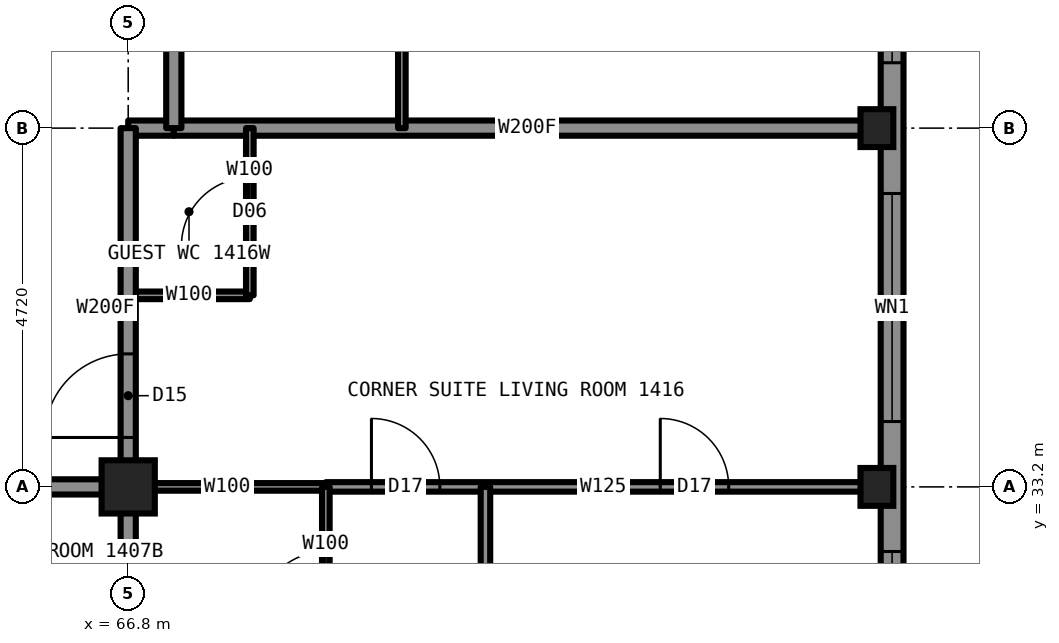
"""IFC4 building model, lengths in metres.
Left out: names, types, materials, properties, quantities, classifications, styles, units other than length and angle.
Written with IfcOpenShell. Run it as: python <this file> out.ifc"""

import sys

from ifc_helpers import new_model, si_unit, direction, frame, frame_2d, origin, origin_2d, place, context, subcontext, project, spatial, rectangle, hollow_rectangle, i_section, extrude, element, fill, save


model = new_model("IFC4")
c1 = context("Model", 3, precision=1e-05, world=origin(), true_north=direction((0.0, 1.0)))
c2 = subcontext(c1, "Body", "Model", "MODEL_VIEW")
j1 = project(units=[si_unit("LENGTHUNIT", "METRE"), si_unit("PLANEANGLEUNIT", "RADIAN")], contexts=[c1])
p1 = place(None, origin())
s1 = spatial("IfcSite", under=j1, at=p1, CompositionType="ELEMENT")
p2 = place(p1, origin())
s2 = spatial("IfcBuilding", under=s1, at=p2, CompositionType="ELEMENT")
p3 = place(p2, frame((0.0, 0.0, 49.5)))
s3 = spatial("IfcBuildingStorey", under=s2, at=p3, CompositionType="ELEMENT", Elevation=49.5)
for number, where, z_axis, x_axis in (
    (1, (76.65, 33.2, 0.0), (0.0, 0.0, 1.0), (1.0, 0.0, 0.0)),
    (2, (76.65, 37.92, 0.0), (0.0, 0.0, 1.0), (1.0, 0.0, 0.0)),
):
    element("IfcColumn", number, at=place(p3, frame(where, z_axis=z_axis, x_axis=x_axis)), inside=s3, PredefinedType="COLUMN", context=c2, shape_type="SweptSolid", body=[
        extrude(i_section(OverallWidth=0.432, OverallDepth=0.498, WebThickness=0.056, FlangeThickness=0.089, at=origin_2d()), origin(), (0.0, 0.0, 1.0), 3.5),
    ])
p4 = place(p3, frame((66.8, 33.2, 0.0), z_axis=(0.0, 0.0, 1.0), x_axis=(1.0, 0.0, 0.0)))
e3 = element("IfcColumn", 3, at=p4, inside=s3, PredefinedType="COLUMN", context=c2, shape_type="SweptSolid", body=[
    extrude(hollow_rectangle(XDim=0.7, YDim=0.7, WallThickness=0.06, at=origin_2d()), origin(), (0.0, 0.0, 1.0), 3.5),
])
p5 = place(p3, frame((66.8, 33.2, 0.0), z_axis=(0.0, 0.0, 1.0), x_axis=(1.0, 0.0, 0.0)))
e4 = element("IfcWall", 4, at=p5, inside=s3, PredefinedType="PARTITIONING", context=c2, shape_type="SweptSolid", body=[
    extrude(rectangle(XDim=2.6, YDim=0.1, at=frame_2d((1.3, 0.0))), origin(), (0.0, 0.0, 1.0), 2.573),
])
p6 = place(p3, frame((43.2, 33.2, 0.0), z_axis=(0.0, 0.0, 1.0), x_axis=(1.0, 0.0, 0.0)))
e5 = element("IfcWall", 5, at=p6, inside=s3, PredefinedType="PARTITIONING", context=c2, shape_type="SweptSolid", body=[
    extrude(rectangle(XDim=23.6, YDim=0.2, at=frame_2d((11.8, 0.0))), origin(), (0.0, 0.0, 1.0), 3.33),
])
p7 = place(p6, frame((3.0, 0.0, 0.0)))
e6 = element("IfcOpeningElement", 6, at=p7, cuts=e5, PredefinedType="OPENING", context=c2, shape_type="SweptSolid", body=[
    extrude(rectangle(XDim=1.0, YDim=2.2, at=frame_2d((0.5, 1.1))), frame((0.0, 0.11, 0.0), z_axis=(0.0, -1.0, 0.0), x_axis=(1.0, 0.0, 0.0)), (0.0, 0.0, 1.0), 0.22),
])
p8 = place(p6, frame((12.44, 0.0, 0.0)))
e7 = element("IfcOpeningElement", 7, at=p8, cuts=e5, PredefinedType="OPENING", context=c2, shape_type="SweptSolid", body=[
    extrude(rectangle(XDim=1.0, YDim=2.2, at=frame_2d((0.5, 1.1))), frame((0.0, 0.11, 0.0), z_axis=(0.0, -1.0, 0.0), x_axis=(1.0, 0.0, 0.0)), (0.0, 0.0, 1.0), 0.22),
])
p9 = place(p6, frame((19.28, 0.0, 0.0)))
e8 = element("IfcOpeningElement", 8, at=p9, cuts=e5, PredefinedType="OPENING", context=c2, shape_type="SweptSolid", body=[
    extrude(rectangle(XDim=1.0, YDim=2.2, at=frame_2d((0.5, 1.1))), frame((0.0, 0.11, 0.0), z_axis=(0.0, -1.0, 0.0), x_axis=(1.0, 0.0, 0.0)), (0.0, 0.0, 1.0), 0.22),
])
p10 = place(p3, frame((69.4, 33.2, 0.0), z_axis=(0.0, 0.0, 1.0), x_axis=(1.0, 0.0, 0.0)))
e9 = element("IfcWall", 9, at=p10, inside=s3, PredefinedType="PARTITIONING", context=c2, shape_type="SweptSolid", body=[
    extrude(rectangle(XDim=7.3, YDim=0.125, at=frame_2d((3.65, 0.0))), origin(), (0.0, 0.0, 1.0), 2.573),
])
p11 = place(p10, frame((0.6, 0.0, 0.0)))
e10 = element("IfcOpeningElement", 10, at=p11, cuts=e9, PredefinedType="OPENING", context=c2, shape_type="SweptSolid", body=[
    extrude(rectangle(XDim=0.9, YDim=2.2, at=frame_2d((0.45, 1.1))), frame((0.0, 0.073, 0.0), z_axis=(0.0, -1.0, 0.0), x_axis=(1.0, 0.0, 0.0)), (0.0, 0.0, 1.0), 0.145),
])
p12 = place(p10, frame((4.4, 0.0, 0.0)))
e11 = element("IfcOpeningElement", 11, at=p12, cuts=e9, PredefinedType="OPENING", context=c2, shape_type="SweptSolid", body=[
    extrude(rectangle(XDim=0.9, YDim=2.2, at=frame_2d((0.45, 1.1))), frame((0.0, 0.073, 0.0), z_axis=(0.0, -1.0, 0.0), x_axis=(1.0, 0.0, 0.0)), (0.0, 0.0, 1.0), 0.145),
])
p13 = place(p3, frame((66.8, 37.92, 0.0), z_axis=(0.0, 0.0, 1.0), x_axis=(1.0, 0.0, 0.0)))
e12 = element("IfcWall", 12, at=p13, inside=s3, PredefinedType="PARTITIONING", context=c2, shape_type="SweptSolid", body=[
    extrude(rectangle(XDim=0.6, YDim=0.2, at=frame_2d((0.3, 0.0))), origin(), (0.0, 0.0, 1.0), 2.573),
])
p14 = place(p3, frame((67.4, 37.92, 0.0), z_axis=(0.0, 0.0, 1.0), x_axis=(1.0, 0.0, 0.0)))
e13 = element("IfcWall", 13, at=p14, inside=s3, PredefinedType="PARTITIONING", context=c2, shape_type="SweptSolid", body=[
    extrude(rectangle(XDim=9.3, YDim=0.2, at=frame_2d((4.65, 0.0))), origin(), (0.0, 0.0, 1.0), 2.573),
])
p15 = place(p3, frame((66.8, 35.72, 0.0), z_axis=(0.0, 0.0, 1.0), x_axis=(1.0, 0.0, 0.0)))
e14 = element("IfcWall", 14, at=p15, inside=s3, PredefinedType="PARTITIONING", context=c2, shape_type="SweptSolid", body=[
    extrude(rectangle(XDim=1.6, YDim=0.1, at=frame_2d((0.8, 0.0))), origin(), (0.0, 0.0, 1.0), 2.723),
])
p16 = place(p3, frame((66.8, 33.2, 0.0), z_axis=(0.0, 0.0, 1.0), x_axis=(0.0, 1.0, 0.0)))
e15 = element("IfcWall", 15, at=p16, inside=s3, PredefinedType="PARTITIONING", context=c2, shape_type="SweptSolid", body=[
    extrude(rectangle(XDim=4.72, YDim=0.2, at=frame_2d((2.36, 0.0))), origin(), (0.0, 0.0, 1.0), 3.33),
])
p17 = place(p16, frame((0.65, 0.0, 0.0)))
e16 = element("IfcOpeningElement", 16, at=p17, cuts=e15, PredefinedType="OPENING", context=c2, shape_type="SweptSolid", body=[
    extrude(rectangle(XDim=1.1, YDim=2.2, at=frame_2d((0.55, 1.1))), frame((0.0, 0.11, 0.0), z_axis=(0.0, -1.0, 0.0), x_axis=(1.0, 0.0, 0.0)), (0.0, 0.0, 1.0), 0.22),
])
p18 = place(p3, frame((66.8, 30.6, 0.0), z_axis=(0.0, 0.0, 1.0), x_axis=(0.0, 1.0, 0.0)))
e17 = element("IfcWall", 17, at=p18, inside=s3, PredefinedType="PARTITIONING", context=c2, shape_type="SweptSolid", body=[
    extrude(rectangle(XDim=2.6, YDim=0.2, at=frame_2d((1.3, 0.0))), origin(), (0.0, 0.0, 1.0), 2.573),
])
p19 = place(p3, frame((67.4, 37.92, 0.0), z_axis=(0.0, 0.0, 1.0), x_axis=(0.0, 1.0, 0.0)))
e18 = element("IfcWall", 18, at=p19, inside=s3, PredefinedType="PARTITIONING", context=c2, shape_type="SweptSolid", body=[
    extrude(rectangle(XDim=14.16, YDim=0.2, at=frame_2d((7.08, 0.0))), origin(), (0.0, 0.0, 1.0), 3.33),
])
p20 = place(p19, frame((3.15, 0.0, 0.0)))
e19 = element("IfcOpeningElement", 19, at=p20, cuts=e18, PredefinedType="OPENING", context=c2, shape_type="SweptSolid", body=[
    extrude(rectangle(XDim=1.0, YDim=2.2, at=frame_2d((0.5, 1.1))), frame((0.0, 0.11, 0.0), z_axis=(0.0, -1.0, 0.0), x_axis=(1.0, 0.0, 0.0)), (0.0, 0.0, 1.0), 0.22),
])
p21 = place(p19, frame((7.72, 0.0, 0.0)))
e20 = element("IfcOpeningElement", 20, at=p21, cuts=e18, PredefinedType="OPENING", context=c2, shape_type="SweptSolid", body=[
    extrude(rectangle(XDim=1.0, YDim=2.2, at=frame_2d((0.5, 1.1))), frame((0.0, 0.11, 0.0), z_axis=(0.0, -1.0, 0.0), x_axis=(1.0, 0.0, 0.0)), (0.0, 0.0, 1.0), 0.22),
])
p22 = place(p3, frame((68.4, 35.72, 0.0), z_axis=(0.0, 0.0, 1.0), x_axis=(0.0, 1.0, 0.0)))
e21 = element("IfcWall", 21, at=p22, inside=s3, PredefinedType="PARTITIONING", context=c2, shape_type="SweptSolid", body=[
    extrude(rectangle(XDim=2.2, YDim=0.1, at=frame_2d((1.1, 0.0))), origin(), (0.0, 0.0, 1.0), 3.33),
])
p23 = place(p22, frame((0.65, 0.0, 0.0)))
e22 = element("IfcOpeningElement", 22, at=p23, cuts=e21, PredefinedType="OPENING", context=c2, shape_type="SweptSolid", body=[
    extrude(rectangle(XDim=0.9, YDim=2.1, at=frame_2d((0.45, 1.05))), frame((0.0, 0.06, 0.0), z_axis=(0.0, -1.0, 0.0), x_axis=(1.0, 0.0, 0.0)), (0.0, 0.0, 1.0), 0.12),
])
p24 = place(p3, frame((69.4, 30.6, 0.0), z_axis=(0.0, 0.0, 1.0), x_axis=(0.0, 1.0, 0.0)))
e23 = element("IfcWall", 23, at=p24, inside=s3, PredefinedType="PARTITIONING", context=c2, shape_type="SweptSolid", body=[
    extrude(rectangle(XDim=2.6, YDim=0.1, at=frame_2d((1.3, 0.0))), origin(), (0.0, 0.0, 1.0), 3.33),
])
p25 = place(p24, frame((0.85, 0.0, 0.0)))
e24 = element("IfcOpeningElement", 24, at=p25, cuts=e23, PredefinedType="OPENING", context=c2, shape_type="SweptSolid", body=[
    extrude(rectangle(XDim=0.9, YDim=2.1, at=frame_2d((0.45, 1.05))), frame((0.0, 0.06, 0.0), z_axis=(0.0, -1.0, 0.0), x_axis=(1.0, 0.0, 0.0)), (0.0, 0.0, 1.0), 0.12),
])
p26 = place(p3, frame((70.4, 37.92, 0.0), z_axis=(0.0, 0.0, 1.0), x_axis=(0.0, 1.0, 0.0)))
e25 = element("IfcWall", 25, at=p26, inside=s3, PredefinedType="PARTITIONING", context=c2, shape_type="SweptSolid", body=[
    extrude(rectangle(XDim=2.9, YDim=0.1, at=frame_2d((1.45, 0.0))), origin(), (0.0, 0.0, 1.0), 3.33),
])
p27 = place(p3, frame((71.5, 23.306, 0.0), z_axis=(0.0, 0.0, 1.0), x_axis=(0.0, 1.0, 0.0)))
e26 = element("IfcWall", 26, at=p27, inside=s3, PredefinedType="PARTITIONING", context=c2, shape_type="SweptSolid", body=[
    extrude(rectangle(XDim=9.894, YDim=0.125, at=frame_2d((4.947, 0.0))), origin(), (0.0, 0.0, 1.0), 3.33),
])
p28 = place(p3, frame((76.85, 28.5, 0.0), z_axis=(0.0, 0.0, 1.0), x_axis=(0.0, 1.0, 0.0)))
e27 = element("IfcWall", 27, at=p28, inside=s3, PredefinedType="SOLIDWALL", context=c2, shape_type="SweptSolid", body=[
    extrude(rectangle(XDim=33.0, YDim=0.3, at=frame_2d((16.5, 0.0))), origin(), (0.0, 0.0, 1.0), 2.83),
])
p29 = place(p28, frame((0.85, 0.0, 0.5)))
e28 = element("IfcOpeningElement", 28, at=p29, cuts=e27, PredefinedType="OPENING", context=c2, shape_type="SweptSolid", body=[
    extrude(rectangle(XDim=3.0, YDim=2.0, at=frame_2d((1.5, 1.0))), frame((0.0, 0.16, 0.0), z_axis=(0.0, -1.0, 0.0), x_axis=(1.0, 0.0, 0.0)), (0.0, 0.0, 1.0), 0.32),
])
p30 = place(p28, frame((5.56, 0.0, 0.5)))
e29 = element("IfcOpeningElement", 29, at=p30, cuts=e27, PredefinedType="OPENING", context=c2, shape_type="SweptSolid", body=[
    extrude(rectangle(XDim=3.0, YDim=2.0, at=frame_2d((1.5, 1.0))), frame((0.0, 0.16, 0.0), z_axis=(0.0, -1.0, 0.0), x_axis=(1.0, 0.0, 0.0)), (0.0, 0.0, 1.0), 0.32),
])
p31 = place(p28, frame((10.28, 0.0, 1.1)))
e30 = element("IfcOpeningElement", 30, at=p31, cuts=e27, PredefinedType="OPENING", context=c2, shape_type="SweptSolid", body=[
    extrude(rectangle(XDim=1.1, YDim=1.4, at=frame_2d((0.55, 0.7))), frame((0.0, 0.16, 0.0), z_axis=(0.0, -1.0, 0.0), x_axis=(1.0, 0.0, 0.0)), (0.0, 0.0, 1.0), 0.32),
])
p32 = place(p28, frame((15.0, 0.0, 0.5)))
e31 = element("IfcOpeningElement", 31, at=p32, cuts=e27, PredefinedType="OPENING", context=c2, shape_type="SweptSolid", body=[
    extrude(rectangle(XDim=3.0, YDim=2.0, at=frame_2d((1.5, 1.0))), frame((0.0, 0.16, 0.0), z_axis=(0.0, -1.0, 0.0), x_axis=(1.0, 0.0, 0.0)), (0.0, 0.0, 1.0), 0.32),
])
p33 = place(p28, frame((21.62, 0.0, 1.1)))
e32 = element("IfcOpeningElement", 32, at=p33, cuts=e27, PredefinedType="OPENING", context=c2, shape_type="SweptSolid", body=[
    extrude(rectangle(XDim=1.1, YDim=1.4, at=frame_2d((0.55, 0.7))), frame((0.0, 0.16, 0.0), z_axis=(0.0, -1.0, 0.0), x_axis=(1.0, 0.0, 0.0)), (0.0, 0.0, 1.0), 0.32),
])
p34 = place(p28, frame((24.44, 0.0, 0.5)))
e33 = element("IfcOpeningElement", 33, at=p34, cuts=e27, PredefinedType="OPENING", context=c2, shape_type="SweptSolid", body=[
    extrude(rectangle(XDim=3.0, YDim=2.0, at=frame_2d((1.5, 1.0))), frame((0.0, 0.16, 0.0), z_axis=(0.0, -1.0, 0.0), x_axis=(1.0, 0.0, 0.0)), (0.0, 0.0, 1.0), 0.32),
])
p35 = place(p28, frame((29.15, 0.0, 0.5)))
e34 = element("IfcOpeningElement", 34, at=p35, cuts=e27, PredefinedType="OPENING", context=c2, shape_type="SweptSolid", body=[
    extrude(rectangle(XDim=3.0, YDim=2.0, at=frame_2d((1.5, 1.0))), frame((0.0, 0.16, 0.0), z_axis=(0.0, -1.0, 0.0), x_axis=(1.0, 0.0, 0.0)), (0.0, 0.0, 1.0), 0.32),
])
p36 = place(p17, origin())
e35 = element("IfcDoor", 35, at=p36, inside=s3, OperationType="SINGLE_SWING_LEFT", PredefinedType="DOOR", context=c2, shape_type="SweptSolid", body=[
    extrude(rectangle(XDim=1.1, YDim=2.2, at=frame_2d((0.55, 1.1))), frame((0.0, 0.025, 0.0), z_axis=(0.0, -1.0, 0.0), x_axis=(1.0, 0.0, 0.0)), (0.0, 0.0, 1.0), 0.05),
])
fill(e16, e35)
p37 = place(p25, origin())
e36 = element("IfcDoor", 36, at=p37, inside=s3, OperationType="SINGLE_SWING_RIGHT", PredefinedType="DOOR", context=c2, shape_type="SweptSolid", body=[
    extrude(rectangle(XDim=0.9, YDim=2.1, at=frame_2d((0.45, 1.05))), frame((0.0, 0.025, 0.0), z_axis=(0.0, -1.0, 0.0), x_axis=(1.0, 0.0, 0.0)), (0.0, 0.0, 1.0), 0.05),
])
fill(e24, e36)
p38 = place(p11, origin())
e37 = element("IfcDoor", 37, at=p38, inside=s3, OperationType="SINGLE_SWING_LEFT", PredefinedType="DOOR", context=c2, shape_type="SweptSolid", body=[
    extrude(rectangle(XDim=0.9, YDim=2.2, at=frame_2d((0.45, 1.1))), frame((0.0, 0.025, 0.0), z_axis=(0.0, -1.0, 0.0), x_axis=(1.0, 0.0, 0.0)), (0.0, 0.0, 1.0), 0.05),
])
fill(e10, e37)
p39 = place(p12, origin())
e38 = element("IfcDoor", 38, at=p39, inside=s3, OperationType="SINGLE_SWING_LEFT", PredefinedType="DOOR", context=c2, shape_type="SweptSolid", body=[
    extrude(rectangle(XDim=0.9, YDim=2.2, at=frame_2d((0.45, 1.1))), frame((0.0, 0.025, 0.0), z_axis=(0.0, -1.0, 0.0), x_axis=(1.0, 0.0, 0.0)), (0.0, 0.0, 1.0), 0.05),
])
fill(e11, e38)
p40 = place(p23, origin())
e39 = element("IfcDoor", 39, at=p40, inside=s3, OperationType="SINGLE_SWING_LEFT", PredefinedType="DOOR", context=c2, shape_type="SweptSolid", body=[
    extrude(rectangle(XDim=0.9, YDim=2.1, at=frame_2d((0.45, 1.05))), frame((0.0, 0.025, 0.0), z_axis=(0.0, -1.0, 0.0), x_axis=(1.0, 0.0, 0.0)), (0.0, 0.0, 1.0), 0.05),
])
fill(e22, e39)
p41 = place(p29, origin())
e40 = element("IfcWindow", 40, at=p41, inside=s3, PartitioningType="SINGLE_PANEL", PredefinedType="WINDOW", context=c2, shape_type="SweptSolid", body=[
    extrude(rectangle(XDim=3.0, YDim=2.0, at=frame_2d((1.5, 1.0))), frame((0.0, 0.03, 0.0), z_axis=(0.0, -1.0, 0.0), x_axis=(1.0, 0.0, 0.0)), (0.0, 0.0, 1.0), 0.06),
])
fill(e28, e40)
p42 = place(p30, origin())
e41 = element("IfcWindow", 41, at=p42, inside=s3, PartitioningType="SINGLE_PANEL", PredefinedType="WINDOW", context=c2, shape_type="SweptSolid", body=[
    extrude(rectangle(XDim=3.0, YDim=2.0, at=frame_2d((1.5, 1.0))), frame((0.0, 0.03, 0.0), z_axis=(0.0, -1.0, 0.0), x_axis=(1.0, 0.0, 0.0)), (0.0, 0.0, 1.0), 0.06),
])
fill(e29, e41)
p43 = place(p31, origin())
e42 = element("IfcWindow", 42, at=p43, inside=s3, PartitioningType="SINGLE_PANEL", PredefinedType="WINDOW", context=c2, shape_type="SweptSolid", body=[
    extrude(rectangle(XDim=1.1, YDim=1.4, at=frame_2d((0.55, 0.7))), frame((0.0, 0.03, 0.0), z_axis=(0.0, -1.0, 0.0), x_axis=(1.0, 0.0, 0.0)), (0.0, 0.0, 1.0), 0.06),
])
fill(e30, e42)
save(model, sys.argv[1])
